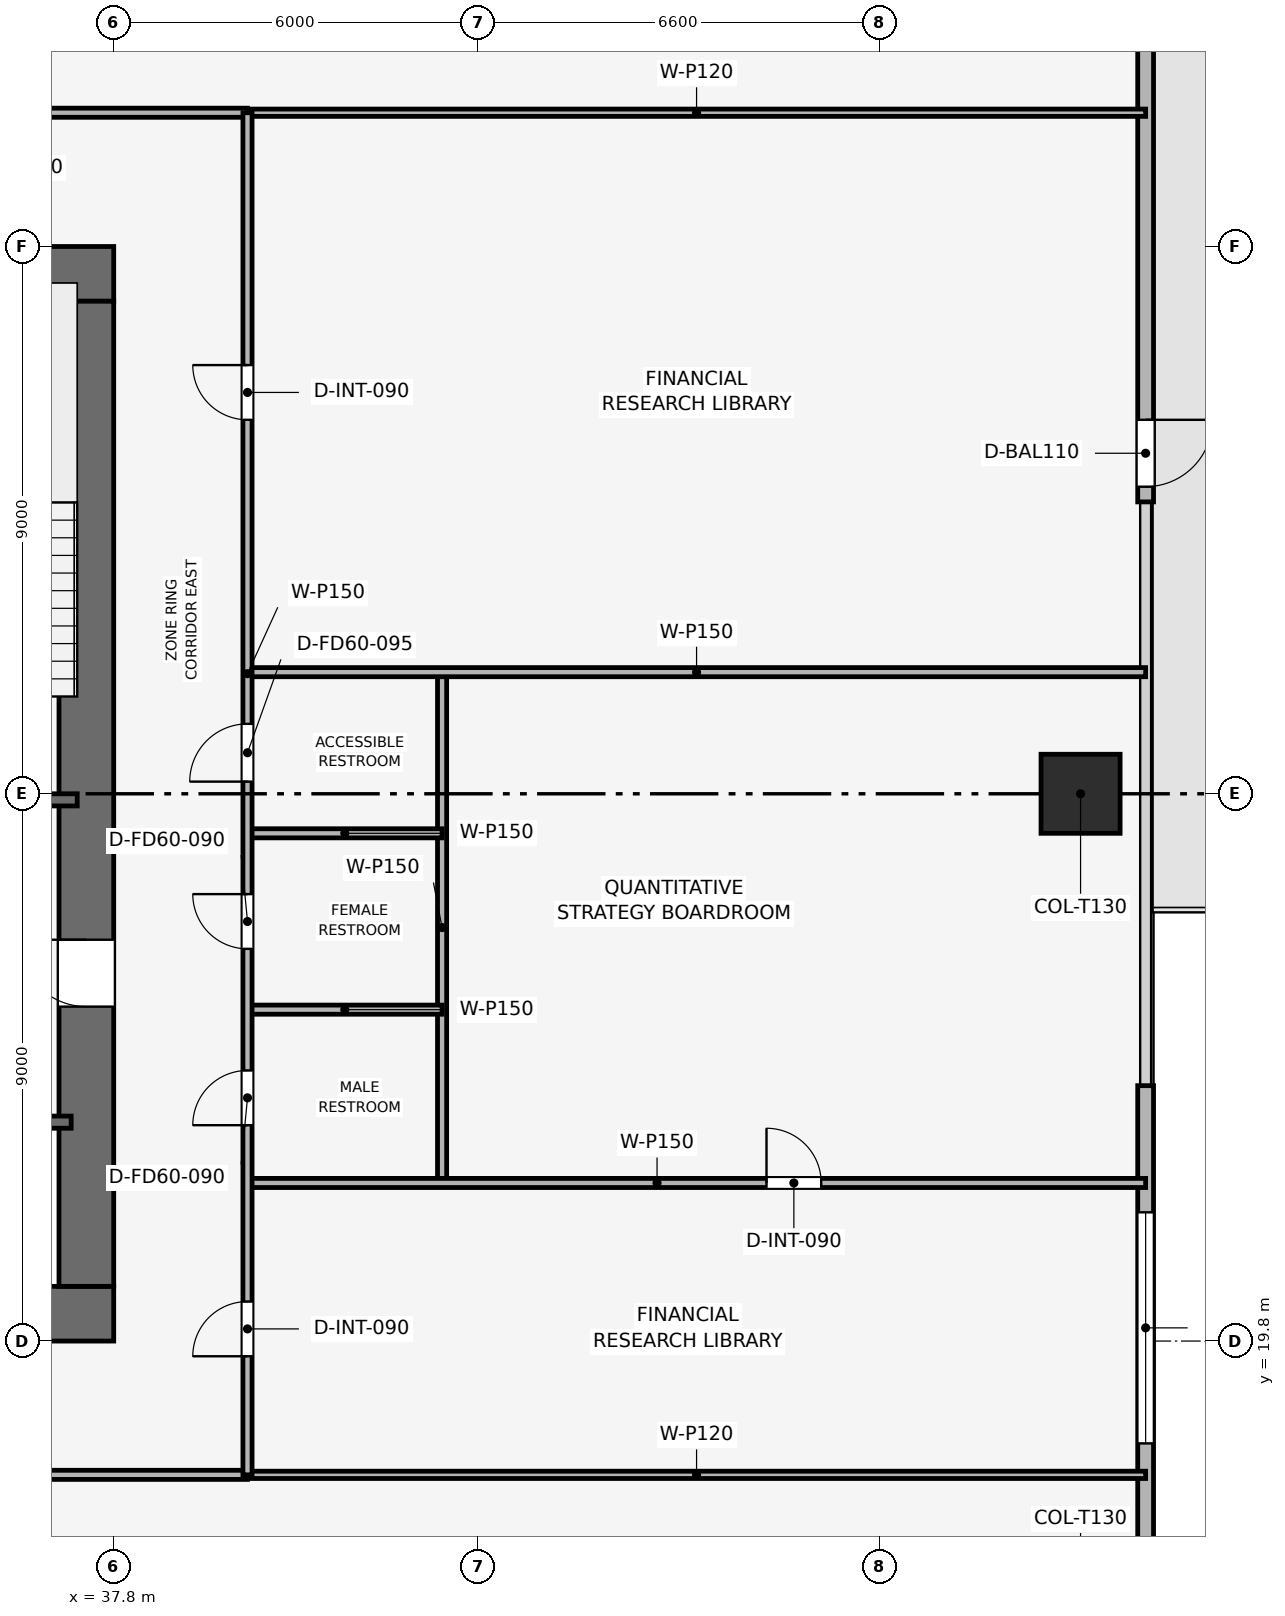
"""IFC4 building model, lengths in metres.
Left out: names, types, materials, properties, quantities, classifications, styles, units other than length and angle.
Written with IfcOpenShell. Run it as: python <this file> out.ifc"""

import sys

from ifc_helpers import new_model, si_unit, direction, frame, frame_2d, origin, origin_2d, place, context, subcontext, project, spatial, rectangle, extrude, element, fill, save


model = new_model("IFC4")
c1 = context("Model", 3, precision=1e-05, world=origin(), true_north=direction((0.0, 1.0)))
c2 = subcontext(c1, "Body", "Model", "MODEL_VIEW")
j1 = project(units=[si_unit("LENGTHUNIT", "METRE"), si_unit("PLANEANGLEUNIT", "RADIAN")], contexts=[c1])
p1 = place(None, origin())
s1 = spatial("IfcSite", under=j1, at=p1, CompositionType="ELEMENT")
p2 = place(p1, origin())
s2 = spatial("IfcBuilding", under=s1, at=p2, CompositionType="ELEMENT")
p3 = place(p2, frame((0.0, 0.0, 117.3)))
s3 = spatial("IfcBuildingStorey", under=s2, at=p3, CompositionType="ELEMENT", Elevation=117.3)
p4 = place(p3, frame((19.8, 20.25, 0.0), z_axis=(0.0, 0.0, 1.0), x_axis=(1.0, 0.0, 0.0)))
e1 = element("IfcWall", 1, at=p4, inside=s3, PredefinedType="SHEAR", context=c2, shape_type="SweptSolid", body=[
    extrude(rectangle(XDim=18.0, YDim=0.9, at=frame_2d((9.0, 0.0))), origin(), (0.0, 0.0, 1.0), 3.9),
])
p5 = place(p4, frame((8.4, 0.0, 0.0)))
e2 = element("IfcOpeningElement", 2, at=p5, cuts=e1, PredefinedType="OPENING", context=c2, shape_type="SweptSolid", body=[
    extrude(rectangle(XDim=1.2, YDim=2.2, at=frame_2d((0.6, 1.1))), frame((0.0, 0.46, 0.0), z_axis=(0.0, -1.0, 0.0), x_axis=(1.0, 0.0, 0.0)), (0.0, 0.0, 1.0), 0.92),
])
p6 = place(p3, frame((19.8, 37.35, 0.0), z_axis=(0.0, 0.0, 1.0), x_axis=(1.0, 0.0, 0.0)))
e3 = element("IfcWall", 3, at=p6, inside=s3, PredefinedType="SHEAR", context=c2, shape_type="SweptSolid", body=[
    extrude(rectangle(XDim=18.0, YDim=0.9, at=frame_2d((9.0, 0.0))), origin(), (0.0, 0.0, 1.0), 3.9),
])
p7 = place(p6, frame((7.05, 0.0, 0.0)))
e4 = element("IfcOpeningElement", 4, at=p7, cuts=e3, PredefinedType="OPENING", context=c2, shape_type="SweptSolid", body=[
    extrude(rectangle(XDim=1.1, YDim=2.15, at=frame_2d((0.55, 1.075))), frame((0.0, 0.46, 0.0), z_axis=(0.0, -1.0, 0.0), x_axis=(1.0, 0.0, 0.0)), (0.0, 0.0, 1.0), 0.92),
])
p8 = place(p3, frame((37.35, 20.7, 0.0), z_axis=(0.0, 0.0, 1.0), x_axis=(0.0, 1.0, 0.0)))
e5 = element("IfcWall", 5, at=p8, inside=s3, PredefinedType="SHEAR", context=c2, shape_type="SweptSolid", body=[
    extrude(rectangle(XDim=16.2, YDim=0.9, at=frame_2d((8.1, 0.0))), origin(), (0.0, 0.0, 1.0), 3.9),
])
p9 = place(p8, frame((4.6, 0.0, 0.0)))
e6 = element("IfcOpeningElement", 6, at=p9, cuts=e5, PredefinedType="OPENING", context=c2, shape_type="SweptSolid", body=[
    extrude(rectangle(XDim=1.1, YDim=2.15, at=frame_2d((0.55, 1.075))), frame((0.0, 0.46, 0.0), z_axis=(0.0, -1.0, 0.0), x_axis=(1.0, 0.0, 0.0)), (0.0, 0.0, 1.0), 0.92),
])
p10 = place(p3, frame((53.7, 28.8, 0.003), z_axis=(0.0, 0.0, 1.0), x_axis=(1.0, 0.0, 0.0)))
e7 = element("IfcColumn", 7, at=p10, inside=s3, PredefinedType="COLUMN", context=c2, shape_type="SweptSolid", body=[
    extrude(rectangle(XDim=1.3, YDim=1.3, at=origin_2d()), origin(), (0.0, 0.0, 1.0), 3.644),
])
p11 = place(p3, frame((54.77, 47.7, 0.0), z_axis=(0.0, 0.0, 1.0), x_axis=(0.0, -1.0, 0.0)))
e8 = element("IfcWall", 8, at=p11, inside=s3, PredefinedType="SOLIDWALL", context=c2, shape_type="SweptSolid", body=[
    extrude(rectangle(XDim=14.1, YDim=0.26, at=frame_2d((7.05, 0.0))), origin(), (0.0, 0.0, 1.0), 3.65),
])
p12 = place(p11, frame((12.75, 0.0, 0.0)))
e9 = element("IfcOpeningElement", 9, at=p12, cuts=e8, PredefinedType="OPENING", context=c2, shape_type="SweptSolid", body=[
    extrude(rectangle(XDim=1.1, YDim=2.2, at=frame_2d((0.55, 1.1))), frame((0.0, 0.14, 0.0), z_axis=(0.0, -1.0, 0.0), x_axis=(1.0, 0.0, 0.0)), (0.0, 0.0, 1.0), 0.28),
])
p13 = place(p3, frame((54.77, 24.0, 0.0), z_axis=(0.0, 0.0, 1.0), x_axis=(0.0, -1.0, 0.0)))
e10 = element("IfcWall", 10, at=p13, inside=s3, PredefinedType="SOLIDWALL", context=c2, shape_type="SweptSolid", body=[
    extrude(rectangle(XDim=14.1, YDim=0.26, at=frame_2d((7.05, 0.0))), origin(), (0.0, 0.0, 1.0), 3.65),
])
p14 = place(p13, frame((2.083, 0.0, 0.9)))
e11 = element("IfcOpeningElement", 11, at=p14, cuts=e10, PredefinedType="OPENING", context=c2, shape_type="SweptSolid", body=[
    extrude(rectangle(XDim=3.8, YDim=1.9, at=frame_2d((1.9, 0.95))), frame((0.0, 0.14, 0.0), z_axis=(0.0, -1.0, 0.0), x_axis=(1.0, 0.0, 0.0)), (0.0, 0.0, 1.0), 0.28),
])
p15 = place(p3, frame((34.05, 28.7, 0.0), z_axis=(0.0, 0.0, 1.0), x_axis=(1.0, 0.0, 0.0)))
e12 = element("IfcWall", 12, at=p15, inside=s3, PredefinedType="SHEAR", context=c2, shape_type="SweptSolid", body=[
    extrude(rectangle(XDim=3.15, YDim=0.2, at=frame_2d((1.575, 0.0))), origin(), (0.0, 0.0, 1.0), 3.65),
])
p16 = place(p15, frame((0.8, 0.0, 0.0)))
e13 = element("IfcOpeningElement", 13, at=p16, cuts=e12, PredefinedType="OPENING", context=c2, shape_type="SweptSolid", body=[
    extrude(rectangle(XDim=1.0, YDim=2.1, at=frame_2d((0.5, 1.05))), frame((0.0, 0.11, 0.0), z_axis=(0.0, -1.0, 0.0), x_axis=(1.0, 0.0, 0.0)), (0.0, 0.0, 1.0), 0.22),
])
p17 = place(p3, frame((34.05, 23.4, 0.0), z_axis=(0.0, 0.0, 1.0), x_axis=(1.0, 0.0, 0.0)))
e14 = element("IfcWall", 14, at=p17, inside=s3, PredefinedType="SHEAR", context=c2, shape_type="SweptSolid", body=[
    extrude(rectangle(XDim=3.05, YDim=0.2, at=frame_2d((1.525, 0.0))), origin(), (0.0, 0.0, 1.0), 3.65),
])
p18 = place(p17, frame((1.2, 0.0, 0.0)))
e15 = element("IfcOpeningElement", 15, at=p18, cuts=e14, PredefinedType="OPENING", context=c2, shape_type="SweptSolid", body=[
    extrude(rectangle(XDim=1.1, YDim=2.15, at=frame_2d((0.55, 1.075))), frame((0.0, 0.11, 0.0), z_axis=(0.0, -1.0, 0.0), x_axis=(1.0, 0.0, 0.0)), (0.0, 0.0, 1.0), 0.22),
])
for number, where, z_axis, x_axis in (
    (16, (40.0, 17.6, 0.0), (0.0, 0.0, 1.0), (1.0, 0.0, 0.0)),
    (17, (40.0, 40.0, 0.0), (0.0, 0.0, 1.0), (1.0, 0.0, 0.0)),
):
    element("IfcWall", number, at=place(p3, frame(where, z_axis=z_axis, x_axis=x_axis)), inside=s3, PredefinedType="PARTITIONING", context=c2, shape_type="SweptSolid", body=[
        extrude(rectangle(XDim=14.77, YDim=0.12, at=frame_2d((7.385, 0.0))), origin(), (0.0, 0.0, 1.0), 3.035),
    ])
p19 = place(p3, frame((43.2, 22.4, 0.0), z_axis=(0.0, 0.0, 1.0), x_axis=(0.0, 1.0, 0.0)))
e18 = element("IfcWall", 18, at=p19, inside=s3, PredefinedType="PARTITIONING", context=c2, shape_type="SweptSolid", body=[
    extrude(rectangle(XDim=8.4, YDim=0.15, at=frame_2d((4.2, 0.0))), origin(), (0.0, 0.0, 1.0), 3.185),
])
p20 = place(p3, frame((40.0, 22.4, 0.0), z_axis=(0.0, 0.0, 1.0), x_axis=(1.0, 0.0, 0.0)))
e19 = element("IfcWall", 19, at=p20, inside=s3, PredefinedType="PARTITIONING", context=c2, shape_type="SweptSolid", body=[
    extrude(rectangle(XDim=14.77, YDim=0.15, at=frame_2d((7.385, 0.0))), origin(), (0.0, 0.0, 1.0), 3.035),
])
p21 = place(p20, frame((8.535, 0.0, 0.0)))
e20 = element("IfcOpeningElement", 20, at=p21, cuts=e19, PredefinedType="OPENING", context=c2, shape_type="SweptSolid", body=[
    extrude(rectangle(XDim=0.9, YDim=2.1, at=frame_2d((0.45, 1.05))), frame((0.0, 0.085, 0.0), z_axis=(0.0, -1.0, 0.0), x_axis=(1.0, 0.0, 0.0)), (0.0, 0.0, 1.0), 0.17),
])
p22 = place(p3, frame((40.0, 30.8, 0.0), z_axis=(0.0, 0.0, 1.0), x_axis=(1.0, 0.0, 0.0)))
e21 = element("IfcWall", 21, at=p22, inside=s3, PredefinedType="PARTITIONING", context=c2, shape_type="SweptSolid", body=[
    extrude(rectangle(XDim=14.77, YDim=0.15, at=frame_2d((7.385, 0.0))), origin(), (0.0, 0.0, 1.0), 3.035),
])
for number, where, z_axis, x_axis in (
    (22, (40.0, 25.25, 0.0), (0.0, 0.0, 1.0), (1.0, 0.0, 0.0)),
    (23, (40.0, 28.15, 0.0), (0.0, 0.0, 1.0), (1.0, 0.0, 0.0)),
):
    element("IfcWall", number, at=place(p3, frame(where, z_axis=z_axis, x_axis=x_axis)), inside=s3, PredefinedType="PARTITIONING", context=c2, shape_type="SweptSolid", body=[
        extrude(rectangle(XDim=3.2, YDim=0.15, at=frame_2d((1.6, 0.0))), origin(), (0.0, 0.0, 1.0), 3.65),
    ])
p23 = place(p3, frame((17.6, 17.6, 0.0), z_axis=(0.0, 0.0, 1.0), x_axis=(1.0, 0.0, 0.0)))
e24 = element("IfcWall", 24, at=p23, inside=s3, PredefinedType="PARTITIONING", context=c2, shape_type="SweptSolid", body=[
    extrude(rectangle(XDim=22.4, YDim=0.15, at=frame_2d((11.2, 0.0))), origin(), (0.0, 0.0, 1.0), 3.185),
])
p24 = place(p23, frame((10.75, 0.0, 0.0)))
e25 = element("IfcOpeningElement", 25, at=p24, cuts=e24, PredefinedType="OPENING", context=c2, shape_type="SweptSolid", body=[
    extrude(rectangle(XDim=0.9, YDim=2.1, at=frame_2d((0.45, 1.05))), frame((0.0, 0.085, 0.0), z_axis=(0.0, -1.0, 0.0), x_axis=(1.0, 0.0, 0.0)), (0.0, 0.0, 1.0), 0.17),
])
p25 = place(p3, frame((17.6, 40.0, 0.0), z_axis=(0.0, 0.0, 1.0), x_axis=(1.0, 0.0, 0.0)))
e26 = element("IfcWall", 26, at=p25, inside=s3, PredefinedType="PARTITIONING", context=c2, shape_type="SweptSolid", body=[
    extrude(rectangle(XDim=22.4, YDim=0.15, at=frame_2d((11.2, 0.0))), origin(), (0.0, 0.0, 1.0), 3.185),
])
p26 = place(p25, frame((0.791, 0.0, 0.0)))
e27 = element("IfcOpeningElement", 27, at=p26, cuts=e26, PredefinedType="OPENING", context=c2, shape_type="SweptSolid", body=[
    extrude(rectangle(XDim=0.9, YDim=2.1, at=frame_2d((0.45, 1.05))), frame((0.0, 0.085, 0.0), z_axis=(0.0, -1.0, 0.0), x_axis=(1.0, 0.0, 0.0)), (0.0, 0.0, 1.0), 0.17),
])
p27 = place(p25, frame((4.914, 0.0, 0.0)))
e28 = element("IfcOpeningElement", 28, at=p27, cuts=e26, PredefinedType="OPENING", context=c2, shape_type="SweptSolid", body=[
    extrude(rectangle(XDim=0.9, YDim=2.1, at=frame_2d((0.45, 1.05))), frame((0.0, 0.085, 0.0), z_axis=(0.0, -1.0, 0.0), x_axis=(1.0, 0.0, 0.0)), (0.0, 0.0, 1.0), 0.17),
])
p28 = place(p25, frame((10.678, 0.0, 0.0)))
e29 = element("IfcOpeningElement", 29, at=p28, cuts=e26, PredefinedType="OPENING", context=c2, shape_type="SweptSolid", body=[
    extrude(rectangle(XDim=0.9, YDim=2.1, at=frame_2d((0.45, 1.05))), frame((0.0, 0.085, 0.0), z_axis=(0.0, -1.0, 0.0), x_axis=(1.0, 0.0, 0.0)), (0.0, 0.0, 1.0), 0.17),
])
p29 = place(p25, frame((17.755, 0.0, 0.0)))
e30 = element("IfcOpeningElement", 30, at=p29, cuts=e26, PredefinedType="OPENING", context=c2, shape_type="SweptSolid", body=[
    extrude(rectangle(XDim=0.9, YDim=2.1, at=frame_2d((0.45, 1.05))), frame((0.0, 0.085, 0.0), z_axis=(0.0, -1.0, 0.0), x_axis=(1.0, 0.0, 0.0)), (0.0, 0.0, 1.0), 0.17),
])
p30 = place(p3, frame((40.0, 17.6, 0.0), z_axis=(0.0, 0.0, 1.0), x_axis=(0.0, 1.0, 0.0)))
e31 = element("IfcWall", 31, at=p30, inside=s3, PredefinedType="PARTITIONING", context=c2, shape_type="SweptSolid", body=[
    extrude(rectangle(XDim=22.4, YDim=0.15, at=frame_2d((11.2, 0.0))), origin(), (0.0, 0.0, 1.0), 3.185),
])
p31 = place(p30, frame((1.95, 0.0, 0.0)))
e32 = element("IfcOpeningElement", 32, at=p31, cuts=e31, PredefinedType="OPENING", context=c2, shape_type="SweptSolid", body=[
    extrude(rectangle(XDim=0.9, YDim=2.1, at=frame_2d((0.45, 1.05))), frame((0.0, 0.085, 0.0), z_axis=(0.0, -1.0, 0.0), x_axis=(1.0, 0.0, 0.0)), (0.0, 0.0, 1.0), 0.17),
])
p32 = place(p30, frame((5.75, 0.0, 0.0)))
e33 = element("IfcOpeningElement", 33, at=p32, cuts=e31, PredefinedType="OPENING", context=c2, shape_type="SweptSolid", body=[
    extrude(rectangle(XDim=0.9, YDim=2.1, at=frame_2d((0.45, 1.05))), frame((0.0, 0.085, 0.0), z_axis=(0.0, -1.0, 0.0), x_axis=(1.0, 0.0, 0.0)), (0.0, 0.0, 1.0), 0.17),
])
p33 = place(p30, frame((8.65, 0.0, 0.0)))
e34 = element("IfcOpeningElement", 34, at=p33, cuts=e31, PredefinedType="OPENING", context=c2, shape_type="SweptSolid", body=[
    extrude(rectangle(XDim=0.9, YDim=2.1, at=frame_2d((0.45, 1.05))), frame((0.0, 0.085, 0.0), z_axis=(0.0, -1.0, 0.0), x_axis=(1.0, 0.0, 0.0)), (0.0, 0.0, 1.0), 0.17),
])
p34 = place(p30, frame((11.4, 0.0, 0.0)))
e35 = element("IfcOpeningElement", 35, at=p34, cuts=e31, PredefinedType="OPENING", context=c2, shape_type="SweptSolid", body=[
    extrude(rectangle(XDim=0.95, YDim=2.1, at=frame_2d((0.475, 1.05))), frame((0.0, 0.085, 0.0), z_axis=(0.0, -1.0, 0.0), x_axis=(1.0, 0.0, 0.0)), (0.0, 0.0, 1.0), 0.17),
])
p35 = place(p30, frame((17.35, 0.0, 0.0)))
e36 = element("IfcOpeningElement", 36, at=p35, cuts=e31, PredefinedType="OPENING", context=c2, shape_type="SweptSolid", body=[
    extrude(rectangle(XDim=0.9, YDim=2.1, at=frame_2d((0.45, 1.05))), frame((0.0, 0.085, 0.0), z_axis=(0.0, -1.0, 0.0), x_axis=(1.0, 0.0, 0.0)), (0.0, 0.0, 1.0), 0.17),
])
p36 = place(p12, origin())
e37 = element("IfcDoor", 37, at=p36, inside=s3, OperationType="SINGLE_SWING_LEFT", PredefinedType="DOOR", context=c2, shape_type="SweptSolid", body=[
    extrude(rectangle(XDim=1.1, YDim=2.2, at=frame_2d((0.55, 1.1))), frame((0.0, 0.025, 0.0), z_axis=(0.0, -1.0, 0.0), x_axis=(1.0, 0.0, 0.0)), (0.0, 0.0, 1.0), 0.05),
])
fill(e9, e37)
p37 = place(p14, origin())
e38 = element("IfcWindow", 38, at=p37, inside=s3, PartitioningType="SINGLE_PANEL", PredefinedType="WINDOW", context=c2, shape_type="SweptSolid", body=[
    extrude(rectangle(XDim=3.8, YDim=1.9, at=frame_2d((1.9, 0.95))), frame((0.0, 0.03, 0.0), z_axis=(0.0, -1.0, 0.0), x_axis=(1.0, 0.0, 0.0)), (0.0, 0.0, 1.0), 0.06),
])
fill(e11, e38)
p38 = place(p21, origin())
e39 = element("IfcDoor", 39, at=p38, inside=s3, OperationType="SINGLE_SWING_LEFT", PredefinedType="DOOR", context=c2, shape_type="SweptSolid", body=[
    extrude(rectangle(XDim=0.9, YDim=2.1, at=frame_2d((0.45, 1.05))), frame((0.0, 0.025, 0.0), z_axis=(0.0, -1.0, 0.0), x_axis=(1.0, 0.0, 0.0)), (0.0, 0.0, 1.0), 0.05),
])
fill(e20, e39)
p39 = place(p31, origin())
e40 = element("IfcDoor", 40, at=p39, inside=s3, OperationType="SINGLE_SWING_LEFT", PredefinedType="DOOR", context=c2, shape_type="SweptSolid", body=[
    extrude(rectangle(XDim=0.9, YDim=2.1, at=frame_2d((0.45, 1.05))), frame((0.0, 0.025, 0.0), z_axis=(0.0, -1.0, 0.0), x_axis=(1.0, 0.0, 0.0)), (0.0, 0.0, 1.0), 0.05),
])
fill(e32, e40)
p40 = place(p32, origin())
e41 = element("IfcDoor", 41, at=p40, inside=s3, OperationType="SINGLE_SWING_LEFT", PredefinedType="DOOR", context=c2, shape_type="SweptSolid", body=[
    extrude(rectangle(XDim=0.9, YDim=2.1, at=frame_2d((0.45, 1.05))), frame((0.0, 0.025, 0.0), z_axis=(0.0, -1.0, 0.0), x_axis=(1.0, 0.0, 0.0)), (0.0, 0.0, 1.0), 0.05),
])
fill(e33, e41)
p41 = place(p33, origin())
e42 = element("IfcDoor", 42, at=p41, inside=s3, OperationType="SINGLE_SWING_RIGHT", PredefinedType="DOOR", context=c2, shape_type="SweptSolid", body=[
    extrude(rectangle(XDim=0.9, YDim=2.1, at=frame_2d((0.45, 1.05))), frame((0.0, 0.025, 0.0), z_axis=(0.0, -1.0, 0.0), x_axis=(1.0, 0.0, 0.0)), (0.0, 0.0, 1.0), 0.05),
])
fill(e34, e42)
p42 = place(p34, origin())
e43 = element("IfcDoor", 43, at=p42, inside=s3, OperationType="SINGLE_SWING_LEFT", PredefinedType="DOOR", context=c2, shape_type="SweptSolid", body=[
    extrude(rectangle(XDim=0.95, YDim=2.1, at=frame_2d((0.475, 1.05))), frame((0.0, 0.025, 0.0), z_axis=(0.0, -1.0, 0.0), x_axis=(1.0, 0.0, 0.0)), (0.0, 0.0, 1.0), 0.05),
])
fill(e35, e43)
p43 = place(p35, origin())
e44 = element("IfcDoor", 44, at=p43, inside=s3, OperationType="SINGLE_SWING_RIGHT", PredefinedType="DOOR", context=c2, shape_type="SweptSolid", body=[
    extrude(rectangle(XDim=0.9, YDim=2.1, at=frame_2d((0.45, 1.05))), frame((0.0, 0.025, 0.0), z_axis=(0.0, -1.0, 0.0), x_axis=(1.0, 0.0, 0.0)), (0.0, 0.0, 1.0), 0.05),
])
fill(e36, e44)
p44 = place(p9, origin())
e45 = element("IfcDoor", 45, at=p44, inside=s3, OperationType="SINGLE_SWING_RIGHT", PredefinedType="DOOR", context=c2, shape_type="SweptSolid", body=[
    extrude(rectangle(XDim=1.1, YDim=2.15, at=frame_2d((0.55, 1.075))), frame((0.0, 0.025, 0.0), z_axis=(0.0, -1.0, 0.0), x_axis=(1.0, 0.0, 0.0)), (0.0, 0.0, 1.0), 0.05),
])
fill(e6, e45)
save(model, sys.argv[1])
